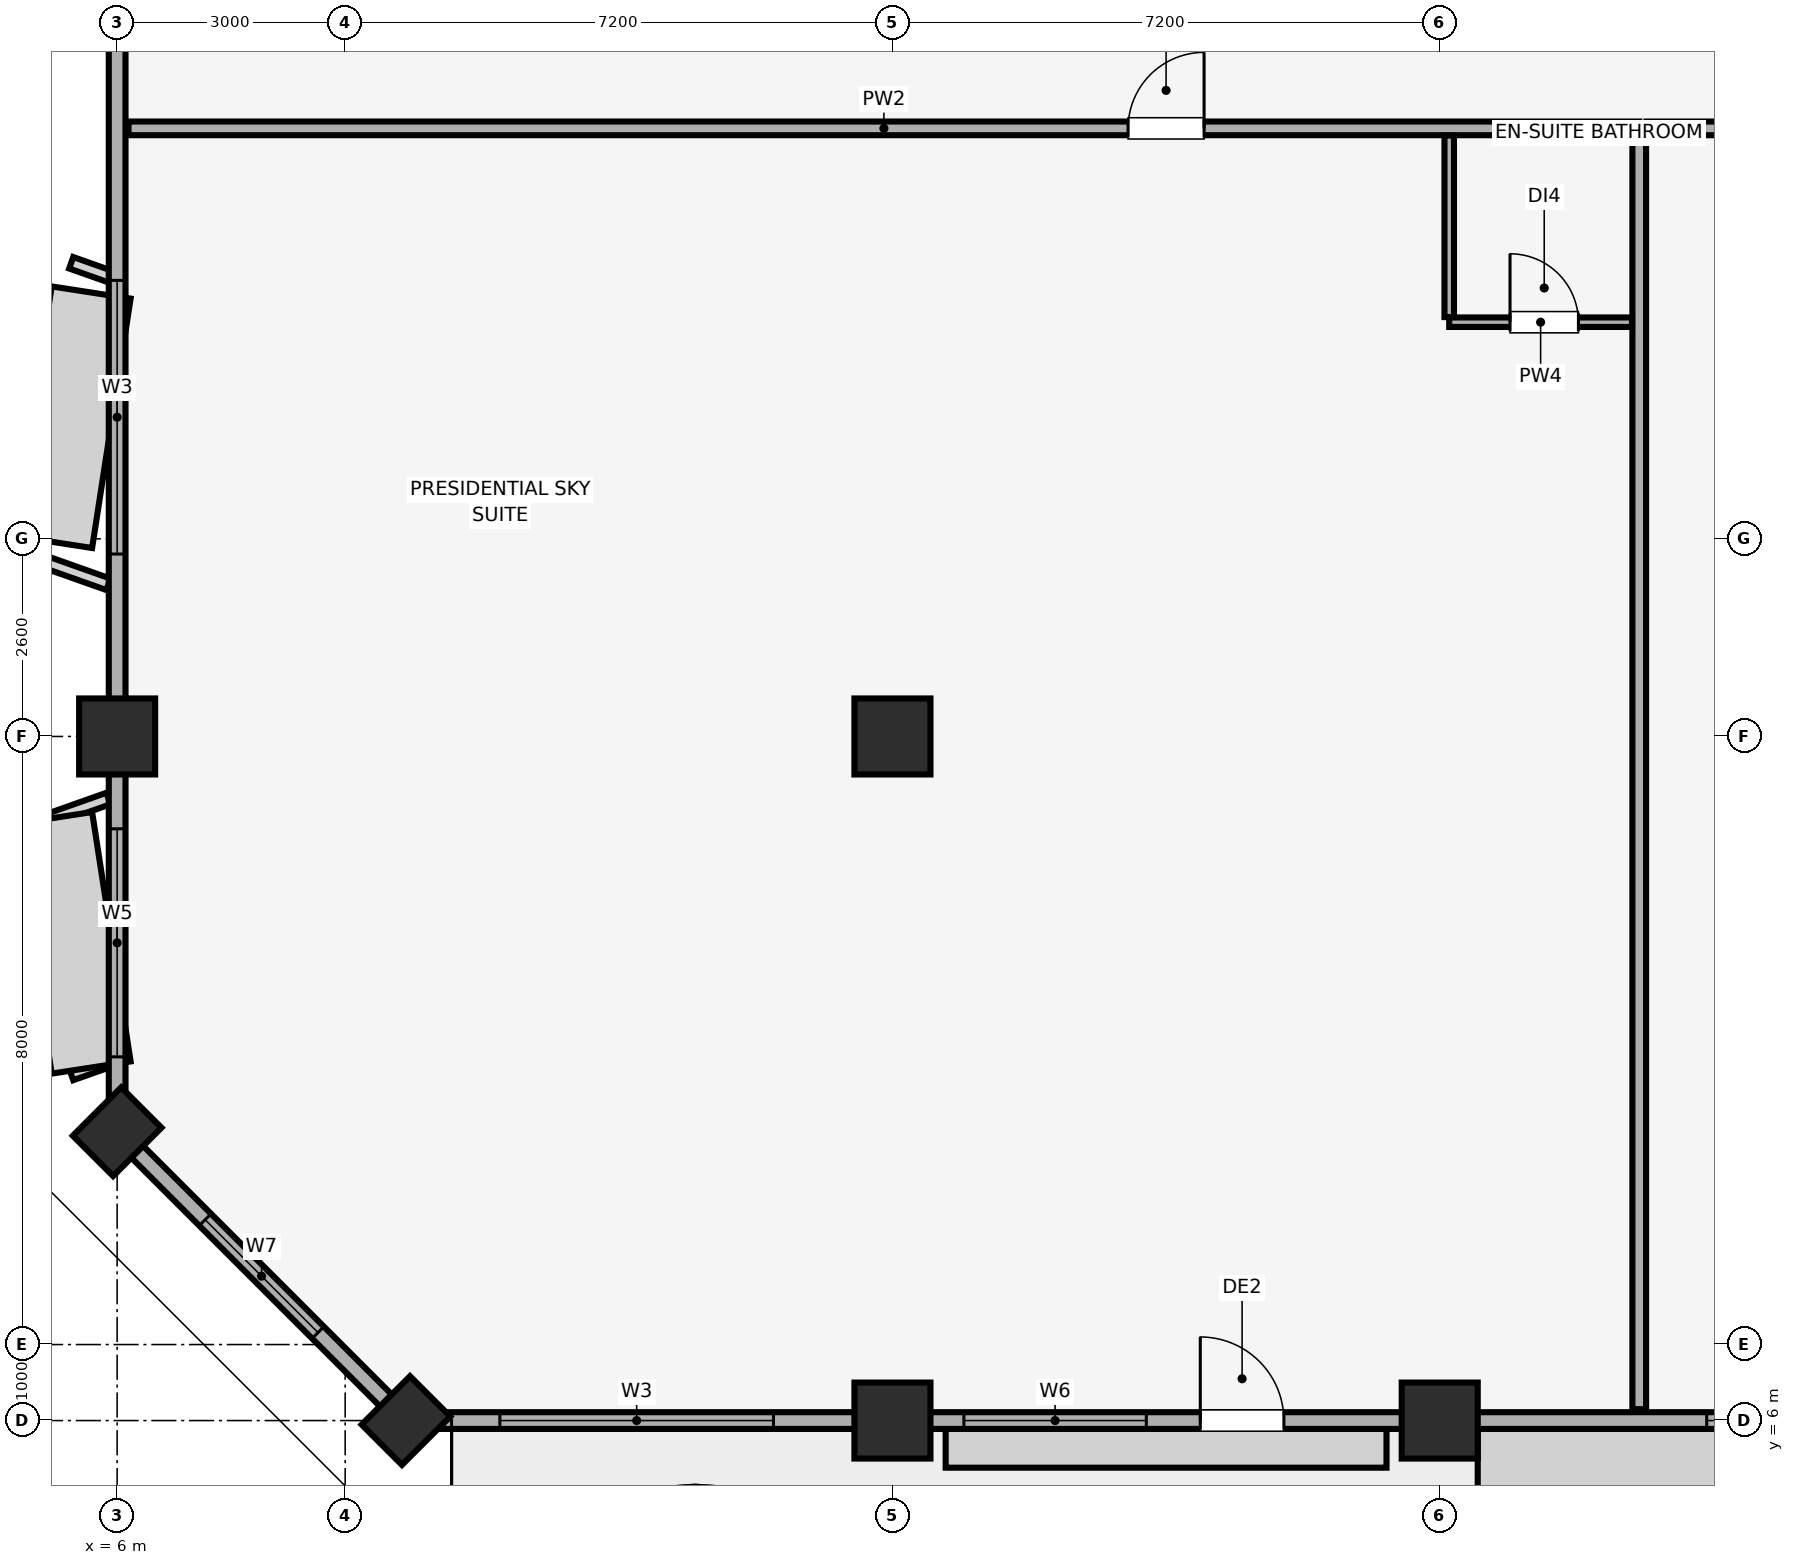
"""IFC4 building model, lengths in metres.
Left out: names, types, materials, properties, quantities, classifications, styles, units other than length and angle.
Written with IfcOpenShell. Run it as: python <this file> out.ifc"""

import sys

from ifc_helpers import new_model, si_unit, direction, frame, frame_2d, origin, origin_2d, place, context, subcontext, project, spatial, rectangle, extrude, element, fill, save


model = new_model("IFC4")
c1 = context("Model", 3, precision=1e-05, world=origin(), true_north=direction((0.0, 1.0)))
c2 = subcontext(c1, "Body", "Model", "MODEL_VIEW")
j1 = project(units=[si_unit("LENGTHUNIT", "METRE"), si_unit("PLANEANGLEUNIT", "RADIAN")], contexts=[c1])
p1 = place(None, origin())
s1 = spatial("IfcSite", under=j1, at=p1, CompositionType="ELEMENT")
p2 = place(p1, origin())
s2 = spatial("IfcBuilding", under=s1, at=p2, CompositionType="ELEMENT")
p3 = place(p2, frame((0.0, 0.0, 276.55)))
s3 = spatial("IfcBuildingStorey", under=s2, at=p3, CompositionType="ELEMENT", Elevation=276.55)
for number, where, z_axis, x_axis in (
    (1, (16.2, 6.0, 0.0), (0.0, 0.0, 1.0), (1.0, 0.0, 0.0)),
    (2, (23.4, 6.0, 0.0), (0.0, 0.0, 1.0), (1.0, 0.0, 0.0)),
    (3, (6.0, 15.0, 0.0), (0.0, 0.0, 1.0), (1.0, 0.0, 0.0)),
):
    element("IfcColumn", number, at=place(p3, frame(where, z_axis=z_axis, x_axis=x_axis)), inside=s3, PredefinedType="COLUMN", context=c2, shape_type="SweptSolid", body=[
        extrude(rectangle(XDim=1.0, YDim=1.0, at=origin_2d()), origin(), (0.0, 0.0, 1.0), 3.6),
    ])
for number, where, z_axis, x_axis in (
    (4, (9.8, 6.0, 0.0), (0.0, 0.0, 1.0), (0.707, 0.707, 0.0)),
    (5, (6.0, 9.8, 0.0), (0.0, 0.0, 1.0), (0.707, 0.707, 0.0)),
):
    element("IfcColumn", number, at=place(p3, frame(where, z_axis=z_axis, x_axis=x_axis)), inside=s3, PredefinedType="PILASTER", context=c2, shape_type="SweptSolid", body=[
        extrude(rectangle(XDim=0.9, YDim=0.75, at=origin_2d()), origin(), (0.0, 0.0, 1.0), 3.6),
    ])
p4 = place(p3, frame((16.2, 15.0, 0.0), z_axis=(0.0, 0.0, 1.0), x_axis=(1.0, 0.0, 0.0)))
e6 = element("IfcColumn", 6, at=p4, inside=s3, PredefinedType="COLUMN", context=c2, shape_type="SweptSolid", body=[
    extrude(rectangle(XDim=1.0, YDim=1.0, at=origin_2d()), origin(), (0.0, 0.0, 1.0), 3.6),
])
p5 = place(p3, frame((9.8, 6.0, 0.0), z_axis=(0.0, 0.0, 1.0), x_axis=(1.0, 0.0, 0.0)))
e7 = element("IfcWall", 7, at=p5, inside=s3, PredefinedType="SOLIDWALL", context=c2, shape_type="SweptSolid", body=[
    extrude(rectangle(XDim=64.4, YDim=0.22, at=frame_2d((32.2, 0.0))), origin(), (0.0, 0.0, 1.0), 2.8),
])
p6 = place(p5, frame((10.45, 0.0, 0.0)))
e8 = element("IfcOpeningElement", 8, at=p6, cuts=e7, PredefinedType="OPENING", context=c2, shape_type="SweptSolid", body=[
    extrude(rectangle(XDim=1.1, YDim=2.15, at=frame_2d((0.55, 1.075))), frame((0.0, 0.12, 0.0), z_axis=(0.0, -1.0, 0.0), x_axis=(1.0, 0.0, 0.0)), (0.0, 0.0, 1.0), 0.24),
])
p7 = place(p5, frame((24.45, 0.0, 0.0)))
e9 = element("IfcOpeningElement", 9, at=p7, cuts=e7, PredefinedType="OPENING", context=c2, shape_type="SweptSolid", body=[
    extrude(rectangle(XDim=1.1, YDim=2.15, at=frame_2d((0.55, 1.075))), frame((0.0, 0.12, 0.0), z_axis=(0.0, -1.0, 0.0), x_axis=(1.0, 0.0, 0.0)), (0.0, 0.0, 1.0), 0.24),
])
p8 = place(p5, frame((52.85, 0.0, 0.0)))
e10 = element("IfcOpeningElement", 10, at=p8, cuts=e7, PredefinedType="OPENING", context=c2, shape_type="SweptSolid", body=[
    extrude(rectangle(XDim=1.1, YDim=2.15, at=frame_2d((0.55, 1.075))), frame((0.0, 0.12, 0.0), z_axis=(0.0, -1.0, 0.0), x_axis=(1.0, 0.0, 0.0)), (0.0, 0.0, 1.0), 0.24),
])
p9 = place(p5, frame((1.235, 0.0, 0.85)))
e11 = element("IfcOpeningElement", 11, at=p9, cuts=e7, PredefinedType="OPENING", context=c2, shape_type="SweptSolid", body=[
    extrude(rectangle(XDim=3.6, YDim=1.75, at=frame_2d((1.8, 0.875))), frame((0.0, 0.12, 0.0), z_axis=(0.0, -1.0, 0.0), x_axis=(1.0, 0.0, 0.0)), (0.0, 0.0, 1.0), 0.24),
])
p10 = place(p5, frame((7.34, 0.0, 0.85)))
e12 = element("IfcOpeningElement", 12, at=p10, cuts=e7, PredefinedType="OPENING", context=c2, shape_type="SweptSolid", body=[
    extrude(rectangle(XDim=2.4, YDim=1.5, at=frame_2d((1.2, 0.75))), frame((0.0, 0.12, 0.0), z_axis=(0.0, -1.0, 0.0), x_axis=(1.0, 0.0, 0.0)), (0.0, 0.0, 1.0), 0.24),
])
p11 = place(p5, frame((17.113, 0.0, 0.85)))
e13 = element("IfcOpeningElement", 13, at=p11, cuts=e7, PredefinedType="OPENING", context=c2, shape_type="SweptSolid", body=[
    extrude(rectangle(XDim=2.4, YDim=1.5, at=frame_2d((1.2, 0.75))), frame((0.0, 0.12, 0.0), z_axis=(0.0, -1.0, 0.0), x_axis=(1.0, 0.0, 0.0)), (0.0, 0.0, 1.0), 0.24),
])
p12 = place(p5, frame((21.99, 0.0, 0.85)))
e14 = element("IfcOpeningElement", 14, at=p12, cuts=e7, PredefinedType="OPENING", context=c2, shape_type="SweptSolid", body=[
    extrude(rectangle(XDim=1.5, YDim=1.4, at=frame_2d((0.75, 0.7))), frame((0.0, 0.12, 0.0), z_axis=(0.0, -1.0, 0.0), x_axis=(1.0, 0.0, 0.0)), (0.0, 0.0, 1.0), 0.24),
])
p13 = place(p5, frame((29.1, 0.0, 0.85)))
e15 = element("IfcOpeningElement", 15, at=p13, cuts=e7, PredefinedType="OPENING", context=c2, shape_type="SweptSolid", body=[
    extrude(rectangle(XDim=2.4, YDim=1.5, at=frame_2d((1.2, 0.75))), frame((0.0, 0.12, 0.0), z_axis=(0.0, -1.0, 0.0), x_axis=(1.0, 0.0, 0.0)), (0.0, 0.0, 1.0), 0.24),
])
p14 = place(p5, frame((32.9, 0.0, 0.85)))
e16 = element("IfcOpeningElement", 16, at=p14, cuts=e7, PredefinedType="OPENING", context=c2, shape_type="SweptSolid", body=[
    extrude(rectangle(XDim=2.4, YDim=1.5, at=frame_2d((1.2, 0.75))), frame((0.0, 0.12, 0.0), z_axis=(0.0, -1.0, 0.0), x_axis=(1.0, 0.0, 0.0)), (0.0, 0.0, 1.0), 0.24),
])
p15 = place(p5, frame((38.2, 0.0, 0.85)))
e17 = element("IfcOpeningElement", 17, at=p15, cuts=e7, PredefinedType="OPENING", context=c2, shape_type="SweptSolid", body=[
    extrude(rectangle(XDim=3.6, YDim=1.75, at=frame_2d((1.8, 0.875))), frame((0.0, 0.12, 0.0), z_axis=(0.0, -1.0, 0.0), x_axis=(1.0, 0.0, 0.0)), (0.0, 0.0, 1.0), 0.24),
])
p16 = place(p5, frame((44.887, 0.0, 0.85)))
e18 = element("IfcOpeningElement", 18, at=p16, cuts=e7, PredefinedType="OPENING", context=c2, shape_type="SweptSolid", body=[
    extrude(rectangle(XDim=2.4, YDim=1.5, at=frame_2d((1.2, 0.75))), frame((0.0, 0.12, 0.0), z_axis=(0.0, -1.0, 0.0), x_axis=(1.0, 0.0, 0.0)), (0.0, 0.0, 1.0), 0.24),
])
p17 = place(p5, frame((54.66, 0.0, 0.85)))
e19 = element("IfcOpeningElement", 19, at=p17, cuts=e7, PredefinedType="OPENING", context=c2, shape_type="SweptSolid", body=[
    extrude(rectangle(XDim=2.4, YDim=1.5, at=frame_2d((1.2, 0.75))), frame((0.0, 0.12, 0.0), z_axis=(0.0, -1.0, 0.0), x_axis=(1.0, 0.0, 0.0)), (0.0, 0.0, 1.0), 0.24),
])
p18 = place(p5, frame((59.565, 0.0, 0.85)))
e20 = element("IfcOpeningElement", 20, at=p18, cuts=e7, PredefinedType="OPENING", context=c2, shape_type="SweptSolid", body=[
    extrude(rectangle(XDim=3.6, YDim=1.75, at=frame_2d((1.8, 0.875))), frame((0.0, 0.12, 0.0), z_axis=(0.0, -1.0, 0.0), x_axis=(1.0, 0.0, 0.0)), (0.0, 0.0, 1.0), 0.24),
])
p19 = place(p3, frame((6.0, 45.2, 0.0), z_axis=(0.0, 0.0, 1.0), x_axis=(0.0, -1.0, 0.0)))
e21 = element("IfcWall", 21, at=p19, inside=s3, PredefinedType="SOLIDWALL", context=c2, shape_type="SweptSolid", body=[
    extrude(rectangle(XDim=35.4, YDim=0.22, at=frame_2d((17.7, 0.0))), origin(), (0.0, 0.0, 1.0), 2.8),
])
p20 = place(p19, frame((31.415, 0.0, 0.85)))
e22 = element("IfcOpeningElement", 22, at=p20, cuts=e21, PredefinedType="OPENING", context=c2, shape_type="SweptSolid", body=[
    extrude(rectangle(XDim=3.0, YDim=1.5, at=frame_2d((1.5, 0.75))), frame((0.0, 0.12, 0.0), z_axis=(0.0, -1.0, 0.0), x_axis=(1.0, 0.0, 0.0)), (0.0, 0.0, 1.0), 0.24),
])
p21 = place(p19, frame((24.2, 0.0, 0.85)))
e23 = element("IfcOpeningElement", 23, at=p21, cuts=e21, PredefinedType="OPENING", context=c2, shape_type="SweptSolid", body=[
    extrude(rectangle(XDim=3.6, YDim=1.65, at=frame_2d((1.8, 0.825))), frame((0.0, 0.12, 0.0), z_axis=(0.0, -1.0, 0.0), x_axis=(1.0, 0.0, 0.0)), (0.0, 0.0, 1.0), 0.24),
])
p22 = place(p19, frame((17.0, 0.0, 0.85)))
e24 = element("IfcOpeningElement", 24, at=p22, cuts=e21, PredefinedType="OPENING", context=c2, shape_type="SweptSolid", body=[
    extrude(rectangle(XDim=2.4, YDim=1.5, at=frame_2d((1.2, 0.75))), frame((0.0, 0.12, 0.0), z_axis=(0.0, -1.0, 0.0), x_axis=(1.0, 0.0, 0.0)), (0.0, 0.0, 1.0), 0.24),
])
p23 = place(p19, frame((11.585, 0.0, 0.85)))
e25 = element("IfcOpeningElement", 25, at=p23, cuts=e21, PredefinedType="OPENING", context=c2, shape_type="SweptSolid", body=[
    extrude(rectangle(XDim=3.0, YDim=1.5, at=frame_2d((1.5, 0.75))), frame((0.0, 0.12, 0.0), z_axis=(0.0, -1.0, 0.0), x_axis=(1.0, 0.0, 0.0)), (0.0, 0.0, 1.0), 0.24),
])
p24 = place(p19, frame((6.815, 0.0, 0.85)))
e26 = element("IfcOpeningElement", 26, at=p24, cuts=e21, PredefinedType="OPENING", context=c2, shape_type="SweptSolid", body=[
    extrude(rectangle(XDim=3.0, YDim=1.5, at=frame_2d((1.5, 0.75))), frame((0.0, 0.12, 0.0), z_axis=(0.0, -1.0, 0.0), x_axis=(1.0, 0.0, 0.0)), (0.0, 0.0, 1.0), 0.24),
])
p25 = place(p19, frame((0.885, 0.0, 0.85)))
e27 = element("IfcOpeningElement", 27, at=p25, cuts=e21, PredefinedType="OPENING", context=c2, shape_type="SweptSolid", body=[
    extrude(rectangle(XDim=3.6, YDim=1.65, at=frame_2d((1.8, 0.825))), frame((0.0, 0.12, 0.0), z_axis=(0.0, -1.0, 0.0), x_axis=(1.0, 0.0, 0.0)), (0.0, 0.0, 1.0), 0.24),
])
p26 = place(p3, frame((6.0, 9.8, 0.0), z_axis=(0.0, 0.0, 1.0), x_axis=(0.707106781187, -0.707106781187, 0.0)))
e28 = element("IfcWall", 28, at=p26, inside=s3, PredefinedType="SOLIDWALL", context=c2, shape_type="SweptSolid", body=[
    extrude(rectangle(XDim=5.374, YDim=0.22, at=frame_2d((2.687, 0.0))), origin(), (0.0, 0.0, 1.0), 2.8),
])
p27 = place(p26, frame((1.637, 0.0, 0.85)))
e29 = element("IfcOpeningElement", 29, at=p27, cuts=e28, PredefinedType="OPENING", context=c2, shape_type="SweptSolid", body=[
    extrude(rectangle(XDim=2.1, YDim=1.6, at=frame_2d((1.05, 0.8))), frame((0.0, 0.12, 0.0), z_axis=(0.0, -1.0, 0.0), x_axis=(1.0, 0.0, 0.0)), (0.0, 0.0, 1.0), 0.24),
])
p28 = place(p3, frame((6.15, 23.0, 0.0), z_axis=(0.0, 0.0, 1.0), x_axis=(1.0, 0.0, 0.0)))
e30 = element("IfcWall", 30, at=p28, inside=s3, PredefinedType="PARTITIONING", context=c2, shape_type="SweptSolid", body=[
    extrude(rectangle(XDim=19.875, YDim=0.18, at=frame_2d((9.938, 0.0))), origin(), (0.0, 0.0, 1.0), 3.6),
])
p29 = place(p28, frame((13.15, 0.0, 0.0)))
e31 = element("IfcOpeningElement", 31, at=p29, cuts=e30, PredefinedType="OPENING", context=c2, shape_type="SweptSolid", body=[
    extrude(rectangle(XDim=1.0, YDim=2.15, at=frame_2d((0.5, 1.075))), frame((0.0, 0.1, 0.0), z_axis=(0.0, -1.0, 0.0), x_axis=(1.0, 0.0, 0.0)), (0.0, 0.0, 1.0), 0.2),
])
p30 = place(p3, frame((26.025, 6.15, 0.0), z_axis=(0.0, 0.0, 1.0), x_axis=(0.0, 1.0, 0.0)))
e32 = element("IfcWall", 32, at=p30, inside=s3, PredefinedType="PARTITIONING", context=c2, shape_type="SweptSolid", body=[
    extrude(rectangle(XDim=16.755, YDim=0.18, at=frame_2d((8.377, 0.0))), origin(), (0.0, 0.0, 1.0), 3.6),
])
p31 = place(p3, frame((23.525, 20.45, 0.0), z_axis=(0.0, 0.0, 1.0), x_axis=(1.0, 0.0, 0.0)))
e33 = element("IfcWall", 33, at=p31, inside=s3, PredefinedType="PARTITIONING", context=c2, shape_type="SweptSolid", body=[
    extrude(rectangle(XDim=2.405, YDim=0.125, at=frame_2d((1.203, 0.0))), origin(), (0.0, 0.0, 1.0), 3.6),
])
p32 = place(p31, frame((0.8, 0.0, 0.0)))
e34 = element("IfcOpeningElement", 34, at=p32, cuts=e33, PredefinedType="OPENING", context=c2, shape_type="SweptSolid", body=[
    extrude(rectangle(XDim=0.9, YDim=2.1, at=frame_2d((0.45, 1.05))), frame((0.0, 0.073, 0.0), z_axis=(0.0, -1.0, 0.0), x_axis=(1.0, 0.0, 0.0)), (0.0, 0.0, 1.0), 0.145),
])
p33 = place(p3, frame((23.525, 20.518, 0.0), z_axis=(0.0, 0.0, 1.0), x_axis=(0.0, 1.0, 0.0)))
e35 = element("IfcWall", 35, at=p33, inside=s3, PredefinedType="PARTITIONING", context=c2, shape_type="SweptSolid", body=[
    extrude(rectangle(XDim=2.387, YDim=0.125, at=frame_2d((1.194, 0.0))), origin(), (0.0, 0.0, 1.0), 3.1),
])
p34 = place(p3, frame((26.12, 23.0, 0.0), z_axis=(0.0, 0.0, 1.0), x_axis=(1.0, 0.0, 0.0)))
e36 = element("IfcWall", 36, at=p34, inside=s3, PredefinedType="PARTITIONING", context=c2, shape_type="SweptSolid", body=[
    extrude(rectangle(XDim=15.88, YDim=0.18, at=frame_2d((7.94, 0.0))), origin(), (0.0, 0.0, 1.0), 3.6),
])
p35 = place(p34, frame((7.58, 0.0, 0.0)))
e37 = element("IfcOpeningElement", 37, at=p35, cuts=e36, PredefinedType="OPENING", context=c2, shape_type="SweptSolid", body=[
    extrude(rectangle(XDim=1.0, YDim=2.15, at=frame_2d((0.5, 1.075))), frame((0.0, 0.1, 0.0), z_axis=(0.0, -1.0, 0.0), x_axis=(1.0, 0.0, 0.0)), (0.0, 0.0, 1.0), 0.2),
])
p36 = place(p27, origin())
e38 = element("IfcWindow", 38, at=p36, inside=s3, PartitioningType="SINGLE_PANEL", PredefinedType="WINDOW", context=c2, shape_type="SweptSolid", body=[
    extrude(rectangle(XDim=2.1, YDim=1.6, at=frame_2d((1.05, 0.8))), frame((0.0, 0.03, 0.0), z_axis=(0.0, -1.0, 0.0), x_axis=(1.0, 0.0, 0.0)), (0.0, 0.0, 1.0), 0.06),
])
fill(e29, e38)
p37 = place(p6, origin())
e39 = element("IfcDoor", 39, at=p37, inside=s3, OperationType="SINGLE_SWING_LEFT", PredefinedType="DOOR", context=c2, shape_type="SweptSolid", body=[
    extrude(rectangle(XDim=1.1, YDim=2.15, at=frame_2d((0.55, 1.075))), frame((0.0, 0.025, 0.0), z_axis=(0.0, -1.0, 0.0), x_axis=(1.0, 0.0, 0.0)), (0.0, 0.0, 1.0), 0.05),
])
fill(e8, e39)
p38 = place(p9, origin())
e40 = element("IfcWindow", 40, at=p38, inside=s3, PartitioningType="SINGLE_PANEL", PredefinedType="WINDOW", context=c2, shape_type="SweptSolid", body=[
    extrude(rectangle(XDim=3.6, YDim=1.75, at=frame_2d((1.8, 0.875))), frame((0.0, 0.03, 0.0), z_axis=(0.0, -1.0, 0.0), x_axis=(1.0, 0.0, 0.0)), (0.0, 0.0, 1.0), 0.06),
])
fill(e11, e40)
p39 = place(p10, origin())
e41 = element("IfcWindow", 41, at=p39, inside=s3, PartitioningType="SINGLE_PANEL", PredefinedType="WINDOW", context=c2, shape_type="SweptSolid", body=[
    extrude(rectangle(XDim=2.4, YDim=1.5, at=frame_2d((1.2, 0.75))), frame((0.0, 0.03, 0.0), z_axis=(0.0, -1.0, 0.0), x_axis=(1.0, 0.0, 0.0)), (0.0, 0.0, 1.0), 0.06),
])
fill(e12, e41)
p40 = place(p11, origin())
e42 = element("IfcWindow", 42, at=p40, inside=s3, PartitioningType="SINGLE_PANEL", PredefinedType="WINDOW", context=c2, shape_type="SweptSolid", body=[
    extrude(rectangle(XDim=2.4, YDim=1.5, at=frame_2d((1.2, 0.75))), frame((0.0, 0.03, 0.0), z_axis=(0.0, -1.0, 0.0), x_axis=(1.0, 0.0, 0.0)), (0.0, 0.0, 1.0), 0.06),
])
fill(e13, e42)
p41 = place(p20, origin())
e43 = element("IfcWindow", 43, at=p41, inside=s3, PartitioningType="SINGLE_PANEL", PredefinedType="WINDOW", context=c2, shape_type="SweptSolid", body=[
    extrude(rectangle(XDim=3.0, YDim=1.5, at=frame_2d((1.5, 0.75))), frame((0.0, 0.03, 0.0), z_axis=(0.0, -1.0, 0.0), x_axis=(1.0, 0.0, 0.0)), (0.0, 0.0, 1.0), 0.06),
])
fill(e22, e43)
p42 = place(p21, origin())
e44 = element("IfcWindow", 44, at=p42, inside=s3, PartitioningType="SINGLE_PANEL", PredefinedType="WINDOW", context=c2, shape_type="SweptSolid", body=[
    extrude(rectangle(XDim=3.6, YDim=1.65, at=frame_2d((1.8, 0.825))), frame((0.0, 0.03, 0.0), z_axis=(0.0, -1.0, 0.0), x_axis=(1.0, 0.0, 0.0)), (0.0, 0.0, 1.0), 0.06),
])
fill(e23, e44)
p43 = place(p29, origin())
e45 = element("IfcDoor", 45, at=p43, inside=s3, OperationType="SINGLE_SWING_RIGHT", PredefinedType="DOOR", context=c2, shape_type="SweptSolid", body=[
    extrude(rectangle(XDim=1.0, YDim=2.15, at=frame_2d((0.5, 1.075))), frame((0.0, 0.025, 0.0), z_axis=(0.0, -1.0, 0.0), x_axis=(1.0, 0.0, 0.0)), (0.0, 0.0, 1.0), 0.05),
])
fill(e31, e45)
p44 = place(p32, origin())
e46 = element("IfcDoor", 46, at=p44, inside=s3, OperationType="SINGLE_SWING_LEFT", PredefinedType="DOOR", context=c2, shape_type="SweptSolid", body=[
    extrude(rectangle(XDim=0.9, YDim=2.1, at=frame_2d((0.45, 1.05))), frame((0.0, 0.025, 0.0), z_axis=(0.0, -1.0, 0.0), x_axis=(1.0, 0.0, 0.0)), (0.0, 0.0, 1.0), 0.05),
])
fill(e34, e46)
save(model, sys.argv[1])
